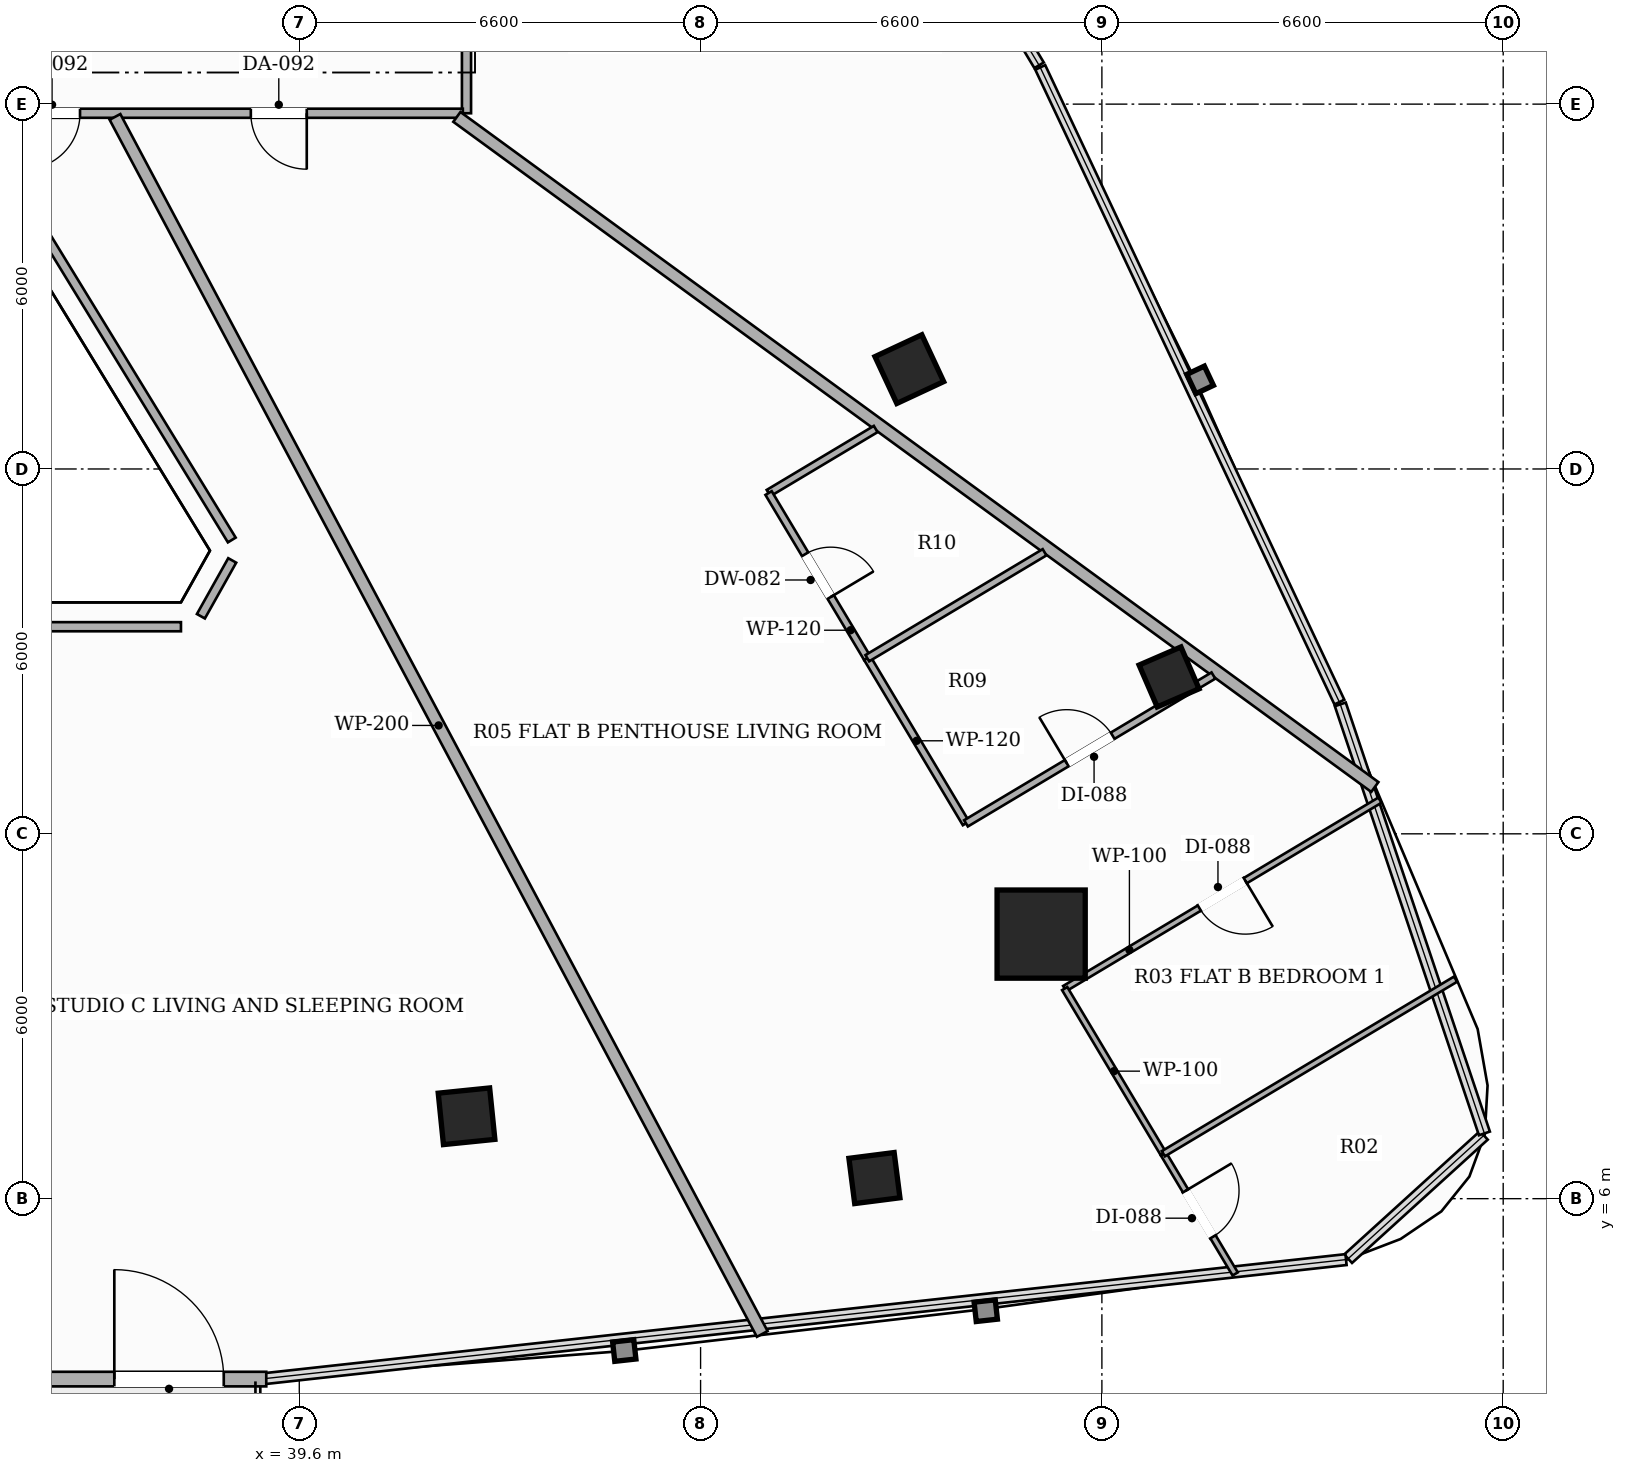
"""IFC4 building model, lengths in metres.
Left out: names, types, materials, properties, quantities, classifications, styles, units other than length and angle.
Written with IfcOpenShell. Run it as: python <this file> out.ifc"""

import sys

from ifc_helpers import new_model, si_unit, direction, frame, frame_2d, origin, origin_2d, place, context, subcontext, project, spatial, rectangle, hollow_rectangle, extrude, element, fill, save


model = new_model("IFC4")
c1 = context("Model", 3, precision=1e-05, world=origin(), true_north=direction((0.0, 1.0)))
c2 = subcontext(c1, "Body", "Model", "MODEL_VIEW")
j1 = project(units=[si_unit("LENGTHUNIT", "METRE"), si_unit("PLANEANGLEUNIT", "RADIAN")], contexts=[c1])
p1 = place(None, origin())
s1 = spatial("IfcSite", under=j1, at=p1, CompositionType="ELEMENT")
p2 = place(p1, origin())
s2 = spatial("IfcBuilding", under=s1, at=p2, CompositionType="ELEMENT")
p3 = place(p2, frame((0.0, 0.0, 116.6)))
s3 = spatial("IfcBuildingStorey", under=s2, at=p3, CompositionType="ELEMENT", Elevation=116.6)
p4 = place(p3, frame((51.801, 10.351, 0.0), z_axis=(0.0, 0.0, 1.0), x_axis=(1.0, 0.0, 0.0)))
e1 = element("IfcColumn", 1, at=p4, inside=s3, PredefinedType="COLUMN", context=c2, shape_type="SweptSolid", body=[
    extrude(hollow_rectangle(XDim=1.45, YDim=1.45, WallThickness=0.045, at=origin_2d()), origin(), (0.0, 0.0, 1.0), 3.3),
])
for number, where, z_axis, x_axis in (
    (2, (42.351, 7.355, 0.0), (0.0, 0.0, 1.0), (0.995, 0.101, 0.0)),
    (3, (49.633, 19.642, 0.0), (0.0, 0.0, 1.0), (-0.423, 0.906, 0.0)),
):
    element("IfcColumn", number, at=place(p3, frame(where, z_axis=z_axis, x_axis=x_axis)), inside=s3, PredefinedType="COLUMN", context=c2, shape_type="SweptSolid", body=[
        extrude(hollow_rectangle(XDim=0.85, YDim=0.85, WallThickness=0.028, at=origin_2d()), origin(), (0.0, 0.0, 1.0), 3.3),
    ])
for number, where, z_axis, x_axis in (
    (4, (49.059, 6.339, 0.0), (0.0, 0.0, 1.0), (0.992, 0.127, 0.0)),
    (5, (53.905, 14.58, 0.0), (0.0, 0.0, 1.0), (-0.397, 0.918, 0.0)),
):
    element("IfcColumn", number, at=place(p3, frame(where, z_axis=z_axis, x_axis=x_axis)), inside=s3, PredefinedType="COLUMN", context=c2, shape_type="SweptSolid", body=[
        extrude(hollow_rectangle(XDim=0.75, YDim=0.75, WallThickness=0.025, at=origin_2d()), origin(), (0.0, 0.0, 1.0), 3.3),
    ])
p5 = place(p3, frame((26.943, 3.033, 0.0), z_axis=(0.0, 0.0, 1.0), x_axis=(1.0, 0.0, 0.0)))
e6 = element("IfcWall", 6, at=p5, inside=s3, PredefinedType="SOLIDWALL", context=c2, shape_type="SweptSolid", body=[
    extrude(rectangle(XDim=12.114, YDim=0.24, at=frame_2d((6.057, 0.0))), origin(), (0.0, 0.0, 1.0), 2.624),
])
p6 = place(p5, frame((9.615, 0.0, 0.0)))
e7 = element("IfcOpeningElement", 7, at=p6, cuts=e6, PredefinedType="OPENING", context=c2, shape_type="SweptSolid", body=[
    extrude(rectangle(XDim=1.8, YDim=2.2, at=frame_2d((0.9, 1.1))), frame((0.0, 0.13, 0.0), z_axis=(0.0, -1.0, 0.0), x_axis=(1.0, 0.0, 0.0)), (0.0, 0.0, 1.0), 0.26),
])
p7 = place(p3, frame((42.35, 28.34, 0.0), z_axis=(0.0, 0.0, 1.0), x_axis=(0.0, -1.0, 0.0)))
e8 = element("IfcWall", 8, at=p7, inside=s3, PredefinedType="PARTITIONING", context=c2, shape_type="SweptSolid", body=[
    extrude(rectangle(XDim=4.49, YDim=0.15, at=frame_2d((2.245, 0.0))), origin(), (0.0, 0.0, 1.0), 2.721),
])
p8 = place(p7, frame((1.805, 0.0, 0.0)))
e9 = element("IfcOpeningElement", 9, at=p8, cuts=e8, PredefinedType="OPENING", context=c2, shape_type="SweptSolid", body=[
    extrude(rectangle(XDim=0.88, YDim=2.1, at=frame_2d((0.44, 1.05))), frame((0.0, 0.085, 0.0), z_axis=(0.0, -1.0, 0.0), x_axis=(1.0, 0.0, 0.0)), (0.0, 0.0, 1.0), 0.17),
])
p9 = place(p3, frame((42.29, 23.85, 0.0), z_axis=(0.0, 0.0, 1.0), x_axis=(-1.0, 0.0, 0.0)))
e10 = element("IfcWall", 10, at=p9, inside=s3, PredefinedType="PARTITIONING", context=c2, shape_type="SweptSolid", body=[
    extrude(rectangle(XDim=8.088, YDim=0.15, at=frame_2d((4.044, 0.0))), origin(), (0.0, 0.0, 1.0), 2.492),
])
p10 = place(p9, frame((2.567, 0.0, 0.0)))
e11 = element("IfcOpeningElement", 11, at=p10, cuts=e10, PredefinedType="OPENING", context=c2, shape_type="SweptSolid", body=[
    extrude(rectangle(XDim=0.92, YDim=2.15, at=frame_2d((0.46, 1.075))), frame((0.0, 0.085, 0.0), z_axis=(0.0, -1.0, 0.0), x_axis=(1.0, 0.0, 0.0)), (0.0, 0.0, 1.0), 0.17),
])
p11 = place(p9, frame((6.296, 0.0, 0.0)))
e12 = element("IfcOpeningElement", 12, at=p11, cuts=e10, PredefinedType="OPENING", context=c2, shape_type="SweptSolid", body=[
    extrude(rectangle(XDim=0.92, YDim=2.15, at=frame_2d((0.46, 1.075))), frame((0.0, 0.085, 0.0), z_axis=(0.0, -1.0, 0.0), x_axis=(1.0, 0.0, 0.0)), (0.0, 0.0, 1.0), 0.17),
])
p12 = place(p3, frame((34.233, 23.79, 0.0), z_axis=(0.0, 0.0, 1.0), x_axis=(0.521893040745, -0.853010934292, 0.0)))
e13 = element("IfcWall", 13, at=p12, inside=s3, PredefinedType="PARTITIONING", context=c2, shape_type="SweptSolid", body=[
    extrude(rectangle(XDim=8.157, YDim=0.15, at=frame_2d((4.079, 0.0))), origin(), (0.0, 0.0, 1.0), 2.721),
])
p13 = place(p3, frame((38.497, 16.496, 0.0), z_axis=(0.0, 0.0, 1.0), x_axis=(-0.489281087794, -0.872126147485, 0.0)))
e14 = element("IfcWall", 14, at=p13, inside=s3, PredefinedType="PARTITIONING", context=c2, shape_type="SweptSolid", body=[
    extrude(rectangle(XDim=1.053, YDim=0.15, at=frame_2d((0.526, 0.0))), origin(), (0.0, 0.0, 1.0), 3.06),
])
p14 = place(p3, frame((37.654, 15.406, 0.0), z_axis=(0.0, 0.0, 1.0), x_axis=(-1.0, 0.0, 0.0)))
e15 = element("IfcWall", 15, at=p14, inside=s3, PredefinedType="PARTITIONING", context=c2, shape_type="SweptSolid", body=[
    extrude(rectangle(XDim=9.308, YDim=0.15, at=frame_2d((4.654, 0.0))), origin(), (0.0, 0.0, 1.0), 2.721),
])
p15 = place(p3, frame((47.214, 3.775, 0.0), z_axis=(0.0, 0.0, 1.0), x_axis=(-0.469567249912, 0.88289670846, 0.0)))
e16 = element("IfcWall", 16, at=p15, inside=s3, PredefinedType="PARTITIONING", context=c2, shape_type="SweptSolid", body=[
    extrude(rectangle(XDim=22.67, YDim=0.2, at=frame_2d((11.335, 0.0))), origin(), (0.0, 0.0, 1.0), 2.413),
])
p16 = place(p3, frame((42.192, 23.79, 0.0), z_axis=(0.0, 0.0, 1.0), x_axis=(0.807710254014, -0.589579634621, 0.0)))
e17 = element("IfcWall", 17, at=p16, inside=s3, PredefinedType="PARTITIONING", context=c2, shape_type="SweptSolid", body=[
    extrude(rectangle(XDim=18.691, YDim=0.2, at=frame_2d((9.346, 0.0))), origin(), (0.0, 0.0, 1.0), 2.413),
])
p17 = place(p3, frame((49.08, 18.657, 0.0), z_axis=(0.0, 0.0, 1.0), x_axis=(-0.858394155401, -0.51299071529, 0.0)))
e18 = element("IfcWall", 18, at=p17, inside=s3, PredefinedType="PARTITIONING", context=c2, shape_type="SweptSolid", body=[
    extrude(rectangle(XDim=2.053, YDim=0.12, at=frame_2d((1.026, 0.0))), origin(), (0.0, 0.0, 1.0), 2.721),
])
p18 = place(p3, frame((47.318, 17.604, 0.0), z_axis=(0.0, 0.0, 1.0), x_axis=(0.51313361254, -0.858308741469, 0.0)))
e19 = element("IfcWall", 19, at=p18, inside=s3, PredefinedType="PARTITIONING", context=c2, shape_type="SweptSolid", body=[
    extrude(rectangle(XDim=3.165, YDim=0.12, at=frame_2d((1.582, 0.0))), origin(), (0.0, 0.0, 1.0), 2.492),
])
p19 = place(p18, frame((1.172, 0.0, 0.0)))
e20 = element("IfcOpeningElement", 20, at=p19, cuts=e19, PredefinedType="OPENING", context=c2, shape_type="SweptSolid", body=[
    extrude(rectangle(XDim=0.82, YDim=2.1, at=frame_2d((0.41, 1.05))), frame((0.0, 0.07, 0.0), z_axis=(0.0, -1.0, 0.0), x_axis=(1.0, 0.0, 0.0)), (0.0, 0.0, 1.0), 0.14),
])
p20 = place(p3, frame((48.942, 14.888, 0.0), z_axis=(0.0, 0.0, 1.0), x_axis=(0.512997049548, -0.858390369911, 0.0)))
e21 = element("IfcWall", 21, at=p20, inside=s3, PredefinedType="PARTITIONING", context=c2, shape_type="SweptSolid", body=[
    extrude(rectangle(XDim=3.164, YDim=0.12, at=frame_2d((1.582, 0.0))), origin(), (0.0, 0.0, 1.0), 2.492),
])
p21 = place(p3, frame((50.565, 12.172, 0.0), z_axis=(0.0, 0.0, 1.0), x_axis=(0.858473034369, 0.512858703018, 0.0)))
e22 = element("IfcWall", 22, at=p21, inside=s3, PredefinedType="PARTITIONING", context=c2, shape_type="SweptSolid", body=[
    extrude(rectangle(XDim=4.74, YDim=0.12, at=frame_2d((2.37, 0.0))), origin(), (0.0, 0.0, 1.0), 2.413),
])
p22 = place(p21, frame((1.93, 0.0, 0.0)))
e23 = element("IfcOpeningElement", 23, at=p22, cuts=e22, PredefinedType="OPENING", context=c2, shape_type="SweptSolid", body=[
    extrude(rectangle(XDim=0.88, YDim=2.1, at=frame_2d((0.44, 1.05))), frame((0.0, 0.07, 0.0), z_axis=(0.0, -1.0, 0.0), x_axis=(1.0, 0.0, 0.0)), (0.0, 0.0, 1.0), 0.14),
])
p23 = place(p3, frame((57.373, 12.554, 0.0), z_axis=(0.0, 0.0, 1.0), x_axis=(-0.858379637305, -0.513015007831, 0.0)))
e24 = element("IfcWall", 24, at=p23, inside=s3, PredefinedType="PARTITIONING", context=c2, shape_type="SweptSolid", body=[
    extrude(rectangle(XDim=6.041, YDim=0.1, at=frame_2d((3.02, 0.0))), origin(), (0.0, 0.0, 1.0), 2.619),
])
p24 = place(p23, frame((2.58, 0.0, 0.0)))
e25 = element("IfcOpeningElement", 25, at=p24, cuts=e24, PredefinedType="OPENING", context=c2, shape_type="SweptSolid", body=[
    extrude(rectangle(XDim=0.88, YDim=2.1, at=frame_2d((0.44, 1.05))), frame((0.0, 0.06, 0.0), z_axis=(0.0, -1.0, 0.0), x_axis=(1.0, 0.0, 0.0)), (0.0, 0.0, 1.0), 0.12),
])
p25 = place(p3, frame((52.188, 9.455, 0.0), z_axis=(0.0, 0.0, 1.0), x_axis=(0.512963071382, -0.858410675259, 0.0)))
e26 = element("IfcWall", 26, at=p25, inside=s3, PredefinedType="PARTITIONING", context=c2, shape_type="SweptSolid", body=[
    extrude(rectangle(XDim=3.164, YDim=0.1, at=frame_2d((1.582, 0.0))), origin(), (0.0, 0.0, 1.0), 2.619),
])
p26 = place(p3, frame((53.811, 6.739, 0.0), z_axis=(0.0, 0.0, 1.0), x_axis=(0.512795384263, -0.858510858335, 0.0)))
e27 = element("IfcWall", 27, at=p26, inside=s3, PredefinedType="PARTITIONING", context=c2, shape_type="SweptSolid", body=[
    extrude(rectangle(XDim=2.303, YDim=0.1, at=frame_2d((1.151, 0.0))), origin(), (0.0, 0.0, 1.0), 3.06),
])
p27 = place(p26, frame((0.711, 0.0, 0.0)))
e28 = element("IfcOpeningElement", 28, at=p27, cuts=e27, PredefinedType="OPENING", context=c2, shape_type="SweptSolid", body=[
    extrude(rectangle(XDim=0.88, YDim=2.1, at=frame_2d((0.44, 1.05))), frame((0.0, 0.06, 0.0), z_axis=(0.0, -1.0, 0.0), x_axis=(1.0, 0.0, 0.0)), (0.0, 0.0, 1.0), 0.12),
])
p28 = place(p3, frame((51.857, 16.63, 0.0), z_axis=(0.0, 0.0, 1.0), x_axis=(-0.858411372428, -0.512961904713, 0.0)))
e29 = element("IfcWall", 29, at=p28, inside=s3, PredefinedType="PARTITIONING", context=c2, shape_type="SweptSolid", body=[
    extrude(rectangle(XDim=3.396, YDim=0.12, at=frame_2d((1.698, 0.0))), origin(), (0.0, 0.0, 1.0), 2.413),
])
p29 = place(p3, frame((58.617, 9.61, 0.0), z_axis=(0.0, 0.0, 1.0), x_axis=(-0.858472602363, -0.512859426151, 0.0)))
e30 = element("IfcWall", 30, at=p29, inside=s3, PredefinedType="PARTITIONING", context=c2, shape_type="SweptSolid", body=[
    extrude(rectangle(XDim=5.598, YDim=0.1, at=frame_2d((2.799, 0.0))), origin(), (0.0, 0.0, 1.0), 3.06),
])
p30 = place(p6, origin())
e31 = element("IfcDoor", 31, at=p30, inside=s3, OperationType="SINGLE_SWING_LEFT", PredefinedType="DOOR", context=c2, shape_type="SweptSolid", body=[
    extrude(rectangle(XDim=1.8, YDim=2.2, at=frame_2d((0.9, 1.1))), frame((0.0, 0.025, 0.0), z_axis=(0.0, -1.0, 0.0), x_axis=(1.0, 0.0, 0.0)), (0.0, 0.0, 1.0), 0.05),
])
fill(e7, e31)
p31 = place(p10, origin())
e32 = element("IfcDoor", 32, at=p31, inside=s3, OperationType="SINGLE_SWING_LEFT", PredefinedType="DOOR", context=c2, shape_type="SweptSolid", body=[
    extrude(rectangle(XDim=0.92, YDim=2.15, at=frame_2d((0.46, 1.075))), frame((0.0, 0.025, 0.0), z_axis=(0.0, -1.0, 0.0), x_axis=(1.0, 0.0, 0.0)), (0.0, 0.0, 1.0), 0.05),
])
fill(e11, e32)
p32 = place(p19, origin())
e33 = element("IfcDoor", 33, at=p32, inside=s3, OperationType="SINGLE_SWING_RIGHT", PredefinedType="DOOR", context=c2, shape_type="SweptSolid", body=[
    extrude(rectangle(XDim=0.82, YDim=2.1, at=frame_2d((0.41, 1.05))), frame((0.0, 0.025, 0.0), z_axis=(0.0, -1.0, 0.0), x_axis=(1.0, 0.0, 0.0)), (0.0, 0.0, 1.0), 0.05),
])
fill(e20, e33)
p33 = place(p22, origin())
e34 = element("IfcDoor", 34, at=p33, inside=s3, OperationType="SINGLE_SWING_LEFT", PredefinedType="DOOR", context=c2, shape_type="SweptSolid", body=[
    extrude(rectangle(XDim=0.88, YDim=2.1, at=frame_2d((0.44, 1.05))), frame((0.0, 0.025, 0.0), z_axis=(0.0, -1.0, 0.0), x_axis=(1.0, 0.0, 0.0)), (0.0, 0.0, 1.0), 0.05),
])
fill(e23, e34)
p34 = place(p24, origin())
e35 = element("IfcDoor", 35, at=p34, inside=s3, OperationType="SINGLE_SWING_LEFT", PredefinedType="DOOR", context=c2, shape_type="SweptSolid", body=[
    extrude(rectangle(XDim=0.88, YDim=2.1, at=frame_2d((0.44, 1.05))), frame((0.0, 0.025, 0.0), z_axis=(0.0, -1.0, 0.0), x_axis=(1.0, 0.0, 0.0)), (0.0, 0.0, 1.0), 0.05),
])
fill(e25, e35)
p35 = place(p27, origin())
e36 = element("IfcDoor", 36, at=p35, inside=s3, OperationType="SINGLE_SWING_LEFT", PredefinedType="DOOR", context=c2, shape_type="SweptSolid", body=[
    extrude(rectangle(XDim=0.88, YDim=2.1, at=frame_2d((0.44, 1.05))), frame((0.0, 0.025, 0.0), z_axis=(0.0, -1.0, 0.0), x_axis=(1.0, 0.0, 0.0)), (0.0, 0.0, 1.0), 0.05),
])
fill(e28, e36)
p36 = place(p11, origin())
e37 = element("IfcDoor", 37, at=p36, inside=s3, OperationType="SINGLE_SWING_RIGHT", PredefinedType="DOOR", context=c2, shape_type="SweptSolid", body=[
    extrude(rectangle(XDim=0.92, YDim=2.15, at=frame_2d((0.46, 1.075))), frame((0.0, 0.025, 0.0), z_axis=(0.0, -1.0, 0.0), x_axis=(1.0, 0.0, 0.0)), (0.0, 0.0, 1.0), 0.05),
])
fill(e12, e37)
save(model, sys.argv[1])
